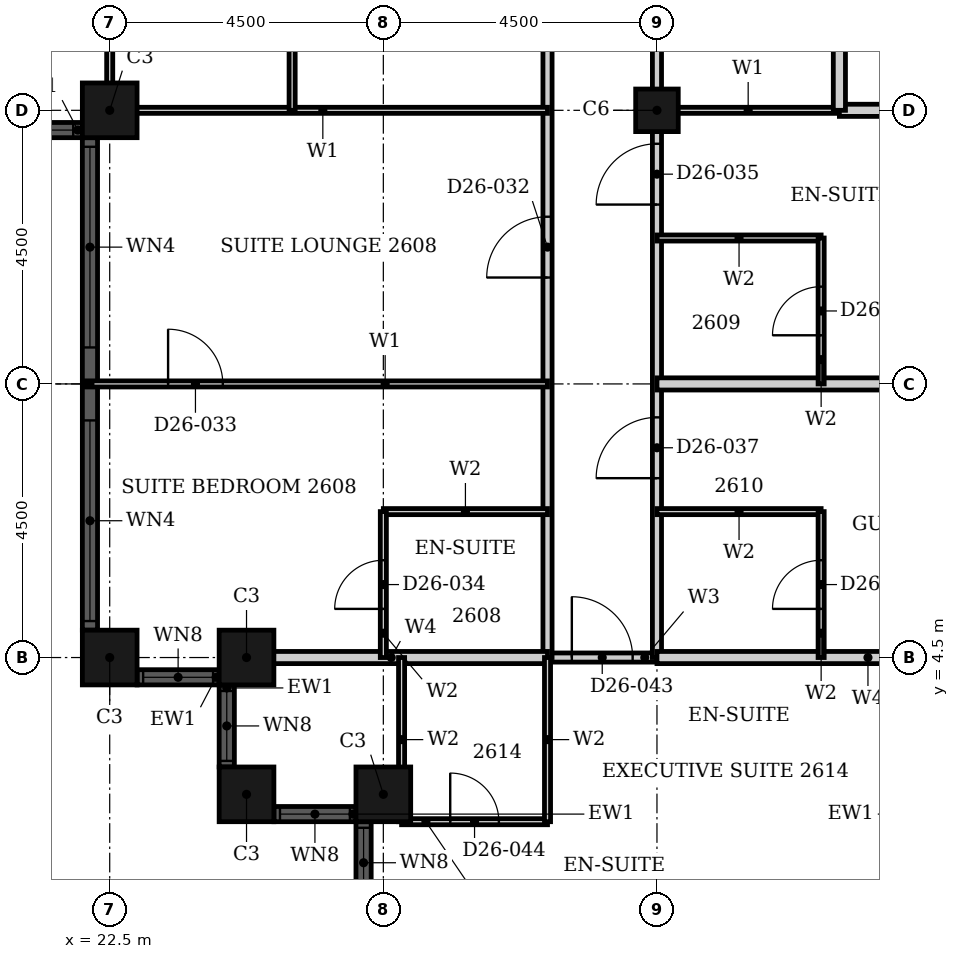
"""IFC4 building model, lengths in metres.
Left out: names, types, materials, properties, quantities, classifications, styles, units other than length and angle.
Written with IfcOpenShell. Run it as: python <this file> out.ifc"""

import sys

from ifc_helpers import new_model, si_unit, direction, frame, frame_2d, origin, origin_2d, place, context, subcontext, project, spatial, rectangle, hollow_rectangle, extrude, element, fill, save


model = new_model("IFC4")
c1 = context("Model", 3, precision=1e-05, world=origin(), true_north=direction((0.0, 1.0)))
c2 = subcontext(c1, "Body", "Model", "MODEL_VIEW")
j1 = project(units=[si_unit("LENGTHUNIT", "METRE"), si_unit("PLANEANGLEUNIT", "RADIAN")], contexts=[c1])
p1 = place(None, origin())
s1 = spatial("IfcSite", under=j1, at=p1, CompositionType="ELEMENT")
p2 = place(p1, origin())
s2 = spatial("IfcBuilding", under=s1, at=p2, CompositionType="ELEMENT")
p3 = place(p2, frame((0.0, 0.0, 108.0)))
s3 = spatial("IfcBuildingStorey", under=s2, at=p3, CompositionType="ELEMENT", Elevation=108.0)
for number, where, z_axis, x_axis in (
    (1, (22.5, 4.5, 0.0), (0.0, 0.0, 1.0), (1.0, 0.0, 0.0)),
    (2, (24.75, 4.5, 0.0), (0.0, 0.0, 1.0), (1.0, 0.0, 0.0)),
    (3, (24.75, 2.25, 0.0), (0.0, 0.0, 1.0), (1.0, 0.0, 0.0)),
    (4, (27.0, 2.25, 0.0), (0.0, 0.0, 1.0), (1.0, 0.0, 0.0)),
    (5, (22.5, 13.5, 0.0), (0.0, 0.0, 1.0), (1.0, 0.0, 0.0)),
):
    element("IfcColumn", number, at=place(p3, frame(where, z_axis=z_axis, x_axis=x_axis)), inside=s3, PredefinedType="COLUMN", context=c2, shape_type="SweptSolid", body=[
        extrude(hollow_rectangle(XDim=0.9, YDim=0.9, WallThickness=0.028, at=origin_2d()), origin(), (0.0, 0.0, 1.0), 3.6),
    ])
p4 = place(p3, frame((31.5, 13.5, 0.0), z_axis=(0.0, 0.0, 1.0), x_axis=(1.0, 0.0, 0.0)))
e6 = element("IfcColumn", 6, at=p4, inside=s3, PredefinedType="COLUMN", context=c2, shape_type="SweptSolid", body=[
    extrude(hollow_rectangle(XDim=0.7, YDim=0.7, WallThickness=0.022, at=origin_2d()), origin(), (0.0, 0.0, 1.0), 3.6),
])
p5 = place(p3, frame((22.95, 4.175, 0.0), z_axis=(0.0, 0.0, 1.0), x_axis=(1.0, 0.0, 0.0)))
e7 = element("IfcWall", 7, at=p5, inside=s3, PredefinedType="SOLIDWALL", context=c2, shape_type="SweptSolid", body=[
    extrude(rectangle(XDim=1.35, YDim=0.25, at=frame_2d((0.675, 0.0))), origin(), (0.0, 0.0, 1.0), 3.6),
])
p6 = place(p5, frame((0.1, 0.0, 0.9)))
e8 = element("IfcOpeningElement", 8, at=p6, cuts=e7, PredefinedType="OPENING", context=c2, shape_type="SweptSolid", body=[
    extrude(rectangle(XDim=1.15, YDim=2.08, at=frame_2d((0.575, 1.04))), frame((0.0, 0.135, 0.0), z_axis=(0.0, -1.0, 0.0), x_axis=(1.0, 0.0, 0.0)), (0.0, 0.0, 1.0), 0.27),
])
p7 = place(p3, frame((24.425, 4.05, 0.0), z_axis=(0.0, 0.0, 1.0), x_axis=(0.0, -1.0, 0.0)))
e9 = element("IfcWall", 9, at=p7, inside=s3, PredefinedType="SOLIDWALL", context=c2, shape_type="SweptSolid", body=[
    extrude(rectangle(XDim=1.35, YDim=0.25, at=frame_2d((0.675, 0.0))), origin(), (0.0, 0.0, 1.0), 3.6),
])
p8 = place(p7, frame((0.1, 0.0, 0.9)))
e10 = element("IfcOpeningElement", 10, at=p8, cuts=e9, PredefinedType="OPENING", context=c2, shape_type="SweptSolid", body=[
    extrude(rectangle(XDim=1.15, YDim=2.08, at=frame_2d((0.575, 1.04))), frame((0.0, 0.135, 0.0), z_axis=(0.0, -1.0, 0.0), x_axis=(1.0, 0.0, 0.0)), (0.0, 0.0, 1.0), 0.27),
])
p9 = place(p3, frame((25.2, 1.925, 0.0), z_axis=(0.0, 0.0, 1.0), x_axis=(1.0, 0.0, 0.0)))
e11 = element("IfcWall", 11, at=p9, inside=s3, PredefinedType="SOLIDWALL", context=c2, shape_type="SweptSolid", body=[
    extrude(rectangle(XDim=1.35, YDim=0.25, at=frame_2d((0.675, 0.0))), origin(), (0.0, 0.0, 1.0), 3.6),
])
p10 = place(p9, frame((0.1, 0.0, 0.9)))
e12 = element("IfcOpeningElement", 12, at=p10, cuts=e11, PredefinedType="OPENING", context=c2, shape_type="SweptSolid", body=[
    extrude(rectangle(XDim=1.15, YDim=2.08, at=frame_2d((0.575, 1.04))), frame((0.0, 0.135, 0.0), z_axis=(0.0, -1.0, 0.0), x_axis=(1.0, 0.0, 0.0)), (0.0, 0.0, 1.0), 0.27),
])
p11 = place(p3, frame((26.675, 1.8, 0.0), z_axis=(0.0, 0.0, 1.0), x_axis=(0.0, -1.0, 0.0)))
e13 = element("IfcWall", 13, at=p11, inside=s3, PredefinedType="SOLIDWALL", context=c2, shape_type="SweptSolid", body=[
    extrude(rectangle(XDim=1.35, YDim=0.25, at=frame_2d((0.675, 0.0))), origin(), (0.0, 0.0, 1.0), 3.6),
])
p12 = place(p11, frame((0.1, 0.0, 0.9)))
e14 = element("IfcOpeningElement", 14, at=p12, cuts=e13, PredefinedType="OPENING", context=c2, shape_type="SweptSolid", body=[
    extrude(rectangle(XDim=1.15, YDim=2.08, at=frame_2d((0.575, 1.04))), frame((0.0, 0.135, 0.0), z_axis=(0.0, -1.0, 0.0), x_axis=(1.0, 0.0, 0.0)), (0.0, 0.0, 1.0), 0.27),
])
p13 = place(p3, frame((18.45, 13.175, 0.0), z_axis=(0.0, 0.0, 1.0), x_axis=(1.0, 0.0, 0.0)))
e15 = element("IfcWall", 15, at=p13, inside=s3, PredefinedType="SOLIDWALL", context=c2, shape_type="SweptSolid", body=[
    extrude(rectangle(XDim=3.6, YDim=0.25, at=frame_2d((1.8, 0.0))), origin(), (0.0, 0.0, 1.0), 3.6),
])
p14 = place(p13, frame((0.15, 0.0, 0.9)))
e16 = element("IfcOpeningElement", 16, at=p14, cuts=e15, PredefinedType="OPENING", context=c2, shape_type="SweptSolid", body=[
    extrude(rectangle(XDim=3.3, YDim=2.08, at=frame_2d((1.65, 1.04))), frame((0.0, 0.135, 0.0), z_axis=(0.0, -1.0, 0.0), x_axis=(1.0, 0.0, 0.0)), (0.0, 0.0, 1.0), 0.27),
])
p15 = place(p3, frame((22.175, 13.05, 0.0), z_axis=(0.0, 0.0, 1.0), x_axis=(0.0, -1.0, 0.0)))
e17 = element("IfcWall", 17, at=p15, inside=s3, PredefinedType="SOLIDWALL", context=c2, shape_type="SweptSolid", body=[
    extrude(rectangle(XDim=8.1, YDim=0.25, at=frame_2d((4.05, 0.0))), origin(), (0.0, 0.0, 1.0), 3.6),
])
p16 = place(p15, frame((0.15, 0.0, 0.9)))
e18 = element("IfcOpeningElement", 18, at=p16, cuts=e17, PredefinedType="OPENING", context=c2, shape_type="SweptSolid", body=[
    extrude(rectangle(XDim=3.3, YDim=2.08, at=frame_2d((1.65, 1.04))), frame((0.0, 0.135, 0.0), z_axis=(0.0, -1.0, 0.0), x_axis=(1.0, 0.0, 0.0)), (0.0, 0.0, 1.0), 0.27),
])
p17 = place(p15, frame((4.65, 0.0, 0.9)))
e19 = element("IfcOpeningElement", 19, at=p17, cuts=e17, PredefinedType="OPENING", context=c2, shape_type="SweptSolid", body=[
    extrude(rectangle(XDim=3.3, YDim=2.08, at=frame_2d((1.65, 1.04))), frame((0.0, 0.135, 0.0), z_axis=(0.0, -1.0, 0.0), x_axis=(1.0, 0.0, 0.0)), (0.0, 0.0, 1.0), 0.27),
])
p18 = place(p3, frame((29.7, 4.5, 0.0), z_axis=(0.0, 0.0, 1.0), x_axis=(1.0, 0.0, 0.0)))
e20 = element("IfcWall", 20, at=p18, inside=s3, PredefinedType="PARTITIONING", context=c2, shape_type="SweptSolid", body=[
    extrude(rectangle(XDim=1.8, YDim=0.15, at=frame_2d((0.9, 0.0))), origin(), (0.0, 0.0, 1.0), 3.3),
])
p19 = place(p18, frame((0.4, 0.0, 0.0)))
e21 = element("IfcOpeningElement", 21, at=p19, cuts=e20, PredefinedType="OPENING", context=c2, shape_type="SweptSolid", body=[
    extrude(rectangle(XDim=1.0, YDim=2.1, at=frame_2d((0.5, 1.05))), frame((0.0, 0.085, 0.0), z_axis=(0.0, -1.0, 0.0), x_axis=(1.0, 0.0, 0.0)), (0.0, 0.0, 1.0), 0.17),
])
p20 = place(p3, frame((29.7, 4.5, 0.0), z_axis=(0.0, 0.0, 1.0), x_axis=(0.0, 1.0, 0.0)))
e22 = element("IfcWall", 22, at=p20, inside=s3, PredefinedType="PARTITIONING", context=c2, shape_type="SweptSolid", body=[
    extrude(rectangle(XDim=16.2, YDim=0.15, at=frame_2d((8.1, 0.0))), origin(), (0.0, 0.0, 1.0), 3.3),
])
p21 = place(p20, frame((6.25, 0.0, 0.0)))
e23 = element("IfcOpeningElement", 23, at=p21, cuts=e22, PredefinedType="OPENING", context=c2, shape_type="SweptSolid", body=[
    extrude(rectangle(XDim=1.0, YDim=2.1, at=frame_2d((0.5, 1.05))), frame((0.0, 0.085, 0.0), z_axis=(0.0, -1.0, 0.0), x_axis=(1.0, 0.0, 0.0)), (0.0, 0.0, 1.0), 0.17),
])
p22 = place(p3, frame((31.5, 4.5, 0.0), z_axis=(0.0, 0.0, 1.0), x_axis=(0.0, 1.0, 0.0)))
e24 = element("IfcWall", 24, at=p22, inside=s3, PredefinedType="PARTITIONING", context=c2, shape_type="SweptSolid", body=[
    extrude(rectangle(XDim=16.2, YDim=0.15, at=frame_2d((8.1, 0.0))), origin(), (0.0, 0.0, 1.0), 2.58),
])
p23 = place(p22, frame((7.45, 0.0, 0.0)))
e25 = element("IfcOpeningElement", 25, at=p23, cuts=e24, PredefinedType="OPENING", context=c2, shape_type="SweptSolid", body=[
    extrude(rectangle(XDim=1.0, YDim=2.1, at=frame_2d((0.5, 1.05))), frame((0.0, 0.085, 0.0), z_axis=(0.0, -1.0, 0.0), x_axis=(1.0, 0.0, 0.0)), (0.0, 0.0, 1.0), 0.17),
])
p24 = place(p22, frame((2.95, 0.0, 0.0)))
e26 = element("IfcOpeningElement", 26, at=p24, cuts=e24, PredefinedType="OPENING", context=c2, shape_type="SweptSolid", body=[
    extrude(rectangle(XDim=1.0, YDim=2.1, at=frame_2d((0.5, 1.05))), frame((0.0, 0.085, 0.0), z_axis=(0.0, -1.0, 0.0), x_axis=(1.0, 0.0, 0.0)), (0.0, 0.0, 1.0), 0.17),
])
p25 = place(p3, frame((31.5, 13.5, 0.0), z_axis=(0.0, 0.0, 1.0), x_axis=(1.0, 0.0, 0.0)))
e27 = element("IfcWall", 27, at=p25, inside=s3, PredefinedType="PARTITIONING", context=c2, shape_type="SweptSolid", body=[
    extrude(rectangle(XDim=3.0, YDim=0.1, at=frame_2d((1.5, 0.0))), origin(), (0.0, 0.0, 1.0), 2.38),
])
p26 = place(p3, frame((22.31, 13.5, 0.0), z_axis=(0.0, 0.0, 1.0), x_axis=(1.0, 0.0, 0.0)))
e28 = element("IfcWall", 28, at=p26, inside=s3, PredefinedType="PARTITIONING", context=c2, shape_type="SweptSolid", body=[
    extrude(rectangle(XDim=7.39, YDim=0.1, at=frame_2d((3.695, 0.0))), origin(), (0.0, 0.0, 1.0), 2.38),
])
p27 = place(p3, frame((22.11, 9.0, 0.0), z_axis=(0.0, 0.0, 1.0), x_axis=(1.0, 0.0, 0.0)))
e29 = element("IfcWall", 29, at=p27, inside=s3, PredefinedType="PARTITIONING", context=c2, shape_type="SweptSolid", body=[
    extrude(rectangle(XDim=7.59, YDim=0.1, at=frame_2d((3.795, 0.0))), origin(), (0.0, 0.0, 1.0), 3.3),
])
p28 = place(p27, frame((1.35, 0.0, 0.0)))
e30 = element("IfcOpeningElement", 30, at=p28, cuts=e29, PredefinedType="OPENING", context=c2, shape_type="SweptSolid", body=[
    extrude(rectangle(XDim=0.9, YDim=2.1, at=frame_2d((0.45, 1.05))), frame((0.0, 0.06, 0.0), z_axis=(0.0, -1.0, 0.0), x_axis=(1.0, 0.0, 0.0)), (0.0, 0.0, 1.0), 0.12),
])
p29 = place(p3, frame((22.5, 13.31, 0.0), z_axis=(0.0, 0.0, 1.0), x_axis=(0.0, 1.0, 0.0)))
e31 = element("IfcWall", 31, at=p29, inside=s3, PredefinedType="PARTITIONING", context=c2, shape_type="SweptSolid", body=[
    extrude(rectangle(XDim=7.39, YDim=0.1, at=frame_2d((3.695, 0.0))), origin(), (0.0, 0.0, 1.0), 3.3),
])
p30 = place(p3, frame((25.5, 13.5, 0.0), z_axis=(0.0, 0.0, 1.0), x_axis=(0.0, 1.0, 0.0)))
e32 = element("IfcWall", 32, at=p30, inside=s3, PredefinedType="PARTITIONING", context=c2, shape_type="SweptSolid", body=[
    extrude(rectangle(XDim=7.2, YDim=0.1, at=frame_2d((3.6, 0.0))), origin(), (0.0, 0.0, 1.0), 3.3),
])
p31 = place(p3, frame((31.5, 4.5, 0.0), z_axis=(0.0, 0.0, 1.0), x_axis=(1.0, 0.0, 0.0)))
e33 = element("IfcWall", 33, at=p31, inside=s3, PredefinedType="PARTITIONING", context=c2, shape_type="SweptSolid", body=[
    extrude(rectangle(XDim=6.94, YDim=0.2, at=frame_2d((3.47, 0.0))), origin(), (0.0, 0.0, 1.0), 3.3),
])
p32 = place(p3, frame((24.56, 4.5, 0.0), z_axis=(0.0, 0.0, 1.0), x_axis=(1.0, 0.0, 0.0)))
e34 = element("IfcWall", 34, at=p32, inside=s3, PredefinedType="PARTITIONING", context=c2, shape_type="SweptSolid", body=[
    extrude(rectangle(XDim=5.14, YDim=0.2, at=frame_2d((2.57, 0.0))), origin(), (0.0, 0.0, 1.0), 3.3),
])
p33 = place(p3, frame((31.5, 9.0, 0.0), z_axis=(0.0, 0.0, 1.0), x_axis=(1.0, 0.0, 0.0)))
e35 = element("IfcWall", 35, at=p33, inside=s3, PredefinedType="PARTITIONING", context=c2, shape_type="SweptSolid", body=[
    extrude(rectangle(XDim=9.39, YDim=0.2, at=frame_2d((4.695, 0.0))), origin(), (0.0, 0.0, 1.0), 3.3),
])
p34 = place(p3, frame((27.3, 1.8, 0.0), z_axis=(0.0, 0.0, 1.0), x_axis=(1.0, 0.0, 0.0)))
e36 = element("IfcWall", 36, at=p34, inside=s3, PredefinedType="PARTITIONING", context=c2, shape_type="SweptSolid", body=[
    extrude(rectangle(XDim=2.4, YDim=0.1, at=frame_2d((1.2, 0.0))), origin(), (0.0, 0.0, 1.0), 3.3),
])
p35 = place(p34, frame((0.8, 0.0, 0.0)))
e37 = element("IfcOpeningElement", 37, at=p35, cuts=e36, PredefinedType="OPENING", context=c2, shape_type="SweptSolid", body=[
    extrude(rectangle(XDim=0.8, YDim=2.1, at=frame_2d((0.4, 1.05))), frame((0.0, 0.06, 0.0), z_axis=(0.0, -1.0, 0.0), x_axis=(1.0, 0.0, 0.0)), (0.0, 0.0, 1.0), 0.12),
])
for number, where, z_axis, x_axis in (
    (38, (31.5, 11.4, 0.0), (0.0, 0.0, 1.0), (1.0, 0.0, 0.0)),
    (39, (31.5, 6.9, 0.0), (0.0, 0.0, 1.0), (1.0, 0.0, 0.0)),
    (40, (27.0, 6.9, 0.0), (0.0, 0.0, 1.0), (1.0, 0.0, 0.0)),
):
    element("IfcWall", number, at=place(p3, frame(where, z_axis=z_axis, x_axis=x_axis)), inside=s3, PredefinedType="PARTITIONING", context=c2, shape_type="SweptSolid", body=[
        extrude(rectangle(XDim=2.7, YDim=0.1, at=frame_2d((1.35, 0.0))), origin(), (0.0, 0.0, 1.0), 3.3),
    ])
p36 = place(p3, frame((27.0, 4.5, 0.0), z_axis=(0.0, 0.0, 1.0), x_axis=(0.0, 1.0, 0.0)))
e41 = element("IfcWall", 41, at=p36, inside=s3, PredefinedType="PARTITIONING", context=c2, shape_type="SweptSolid", body=[
    extrude(rectangle(XDim=2.4, YDim=0.1, at=frame_2d((1.2, 0.0))), origin(), (0.0, 0.0, 1.0), 2.58),
])
p37 = place(p36, frame((0.8, 0.0, 0.0)))
e42 = element("IfcOpeningElement", 42, at=p37, cuts=e41, PredefinedType="OPENING", context=c2, shape_type="SweptSolid", body=[
    extrude(rectangle(XDim=0.8, YDim=2.1, at=frame_2d((0.4, 1.05))), frame((0.0, 0.06, 0.0), z_axis=(0.0, -1.0, 0.0), x_axis=(1.0, 0.0, 0.0)), (0.0, 0.0, 1.0), 0.12),
])
for number, where, z_axis, x_axis in (
    (43, (27.3, 1.8, 0.0), (0.0, 0.0, 1.0), (0.0, 1.0, 0.0)),
    (44, (29.7, 1.8, 0.0), (0.0, 0.0, 1.0), (0.0, 1.0, 0.0)),
):
    element("IfcWall", number, at=place(p3, frame(where, z_axis=z_axis, x_axis=x_axis)), inside=s3, PredefinedType="PARTITIONING", context=c2, shape_type="SweptSolid", body=[
        extrude(rectangle(XDim=2.7, YDim=0.1, at=frame_2d((1.35, 0.0))), origin(), (0.0, 0.0, 1.0), 3.3),
    ])
p38 = place(p3, frame((34.2, 9.0, 0.0), z_axis=(0.0, 0.0, 1.0), x_axis=(0.0, 1.0, 0.0)))
e45 = element("IfcWall", 45, at=p38, inside=s3, PredefinedType="PARTITIONING", context=c2, shape_type="SweptSolid", body=[
    extrude(rectangle(XDim=2.4, YDim=0.1, at=frame_2d((1.2, 0.0))), origin(), (0.0, 0.0, 1.0), 3.3),
])
p39 = place(p38, frame((0.8, 0.0, 0.0)))
e46 = element("IfcOpeningElement", 46, at=p39, cuts=e45, PredefinedType="OPENING", context=c2, shape_type="SweptSolid", body=[
    extrude(rectangle(XDim=0.8, YDim=2.1, at=frame_2d((0.4, 1.05))), frame((0.0, 0.06, 0.0), z_axis=(0.0, -1.0, 0.0), x_axis=(1.0, 0.0, 0.0)), (0.0, 0.0, 1.0), 0.12),
])
p40 = place(p3, frame((34.2, 4.5, 0.0), z_axis=(0.0, 0.0, 1.0), x_axis=(0.0, 1.0, 0.0)))
e47 = element("IfcWall", 47, at=p40, inside=s3, PredefinedType="PARTITIONING", context=c2, shape_type="SweptSolid", body=[
    extrude(rectangle(XDim=2.4, YDim=0.1, at=frame_2d((1.2, 0.0))), origin(), (0.0, 0.0, 1.0), 3.3),
])
p41 = place(p40, frame((0.8, 0.0, 0.0)))
e48 = element("IfcOpeningElement", 48, at=p41, cuts=e47, PredefinedType="OPENING", context=c2, shape_type="SweptSolid", body=[
    extrude(rectangle(XDim=0.8, YDim=2.1, at=frame_2d((0.4, 1.05))), frame((0.0, 0.06, 0.0), z_axis=(0.0, -1.0, 0.0), x_axis=(1.0, 0.0, 0.0)), (0.0, 0.0, 1.0), 0.12),
])
p42 = place(p3, frame((34.5, 13.5, 0.0), z_axis=(0.0, 0.0, 1.0), x_axis=(1.0, 0.0, 0.0)))
e49 = element("IfcWall", 49, at=p42, inside=s3, PredefinedType="PARTITIONING", context=c2, shape_type="SweptSolid", body=[
    extrude(rectangle(XDim=6.19, YDim=0.2, at=frame_2d((3.095, 0.0))), origin(), (0.0, 0.0, 1.0), 2.38),
])
p43 = place(p3, frame((34.5, 13.5, 0.0), z_axis=(0.0, 0.0, 1.0), x_axis=(0.0, 1.0, 0.0)))
e50 = element("IfcWall", 50, at=p43, inside=s3, PredefinedType="PARTITIONING", context=c2, shape_type="SweptSolid", body=[
    extrude(rectangle(XDim=7.2, YDim=0.2, at=frame_2d((3.6, 0.0))), origin(), (0.0, 0.0, 1.0), 3.3),
])
p44 = place(p6, origin())
e51 = element("IfcWindow", 51, at=p44, inside=s3, PartitioningType="SINGLE_PANEL", PredefinedType="WINDOW", context=c2, shape_type="SweptSolid", body=[
    extrude(rectangle(XDim=1.15, YDim=2.08, at=frame_2d((0.575, 1.04))), frame((0.0, 0.03, 0.0), z_axis=(0.0, -1.0, 0.0), x_axis=(1.0, 0.0, 0.0)), (0.0, 0.0, 1.0), 0.06),
])
fill(e8, e51)
p45 = place(p8, origin())
e52 = element("IfcWindow", 52, at=p45, inside=s3, PartitioningType="SINGLE_PANEL", PredefinedType="WINDOW", context=c2, shape_type="SweptSolid", body=[
    extrude(rectangle(XDim=1.15, YDim=2.08, at=frame_2d((0.575, 1.04))), frame((0.0, 0.03, 0.0), z_axis=(0.0, -1.0, 0.0), x_axis=(1.0, 0.0, 0.0)), (0.0, 0.0, 1.0), 0.06),
])
fill(e10, e52)
p46 = place(p10, origin())
e53 = element("IfcWindow", 53, at=p46, inside=s3, PartitioningType="SINGLE_PANEL", PredefinedType="WINDOW", context=c2, shape_type="SweptSolid", body=[
    extrude(rectangle(XDim=1.15, YDim=2.08, at=frame_2d((0.575, 1.04))), frame((0.0, 0.03, 0.0), z_axis=(0.0, -1.0, 0.0), x_axis=(1.0, 0.0, 0.0)), (0.0, 0.0, 1.0), 0.06),
])
fill(e12, e53)
p47 = place(p12, origin())
e54 = element("IfcWindow", 54, at=p47, inside=s3, PartitioningType="SINGLE_PANEL", PredefinedType="WINDOW", context=c2, shape_type="SweptSolid", body=[
    extrude(rectangle(XDim=1.15, YDim=2.08, at=frame_2d((0.575, 1.04))), frame((0.0, 0.03, 0.0), z_axis=(0.0, -1.0, 0.0), x_axis=(1.0, 0.0, 0.0)), (0.0, 0.0, 1.0), 0.06),
])
fill(e14, e54)
p48 = place(p14, origin())
e55 = element("IfcWindow", 55, at=p48, inside=s3, PartitioningType="SINGLE_PANEL", PredefinedType="WINDOW", context=c2, shape_type="SweptSolid", body=[
    extrude(rectangle(XDim=3.3, YDim=2.08, at=frame_2d((1.65, 1.04))), frame((0.0, 0.03, 0.0), z_axis=(0.0, -1.0, 0.0), x_axis=(1.0, 0.0, 0.0)), (0.0, 0.0, 1.0), 0.06),
])
fill(e16, e55)
p49 = place(p16, origin())
e56 = element("IfcWindow", 56, at=p49, inside=s3, PartitioningType="SINGLE_PANEL", PredefinedType="WINDOW", context=c2, shape_type="SweptSolid", body=[
    extrude(rectangle(XDim=3.3, YDim=2.08, at=frame_2d((1.65, 1.04))), frame((0.0, 0.03, 0.0), z_axis=(0.0, -1.0, 0.0), x_axis=(1.0, 0.0, 0.0)), (0.0, 0.0, 1.0), 0.06),
])
fill(e18, e56)
p50 = place(p17, origin())
e57 = element("IfcWindow", 57, at=p50, inside=s3, PartitioningType="SINGLE_PANEL", PredefinedType="WINDOW", context=c2, shape_type="SweptSolid", body=[
    extrude(rectangle(XDim=3.3, YDim=2.08, at=frame_2d((1.65, 1.04))), frame((0.0, 0.03, 0.0), z_axis=(0.0, -1.0, 0.0), x_axis=(1.0, 0.0, 0.0)), (0.0, 0.0, 1.0), 0.06),
])
fill(e19, e57)
p51 = place(p21, origin())
e58 = element("IfcDoor", 58, at=p51, inside=s3, OperationType="SINGLE_SWING_RIGHT", PredefinedType="DOOR", context=c2, shape_type="SweptSolid", body=[
    extrude(rectangle(XDim=1.0, YDim=2.1, at=frame_2d((0.5, 1.05))), frame((0.0, 0.025, 0.0), z_axis=(0.0, -1.0, 0.0), x_axis=(1.0, 0.0, 0.0)), (0.0, 0.0, 1.0), 0.05),
])
fill(e23, e58)
p52 = place(p28, origin())
e59 = element("IfcDoor", 59, at=p52, inside=s3, OperationType="SINGLE_SWING_LEFT", PredefinedType="DOOR", context=c2, shape_type="SweptSolid", body=[
    extrude(rectangle(XDim=0.9, YDim=2.1, at=frame_2d((0.45, 1.05))), frame((0.0, 0.025, 0.0), z_axis=(0.0, -1.0, 0.0), x_axis=(1.0, 0.0, 0.0)), (0.0, 0.0, 1.0), 0.05),
])
fill(e30, e59)
p53 = place(p37, origin())
e60 = element("IfcDoor", 60, at=p53, inside=s3, OperationType="SINGLE_SWING_LEFT", PredefinedType="DOOR", context=c2, shape_type="SweptSolid", body=[
    extrude(rectangle(XDim=0.8, YDim=2.1, at=frame_2d((0.4, 1.05))), frame((0.0, 0.025, 0.0), z_axis=(0.0, -1.0, 0.0), x_axis=(1.0, 0.0, 0.0)), (0.0, 0.0, 1.0), 0.05),
])
fill(e42, e60)
p54 = place(p23, origin())
e61 = element("IfcDoor", 61, at=p54, inside=s3, OperationType="SINGLE_SWING_RIGHT", PredefinedType="DOOR", context=c2, shape_type="SweptSolid", body=[
    extrude(rectangle(XDim=1.0, YDim=2.1, at=frame_2d((0.5, 1.05))), frame((0.0, 0.025, 0.0), z_axis=(0.0, -1.0, 0.0), x_axis=(1.0, 0.0, 0.0)), (0.0, 0.0, 1.0), 0.05),
])
fill(e25, e61)
p55 = place(p39, origin())
e62 = element("IfcDoor", 62, at=p55, inside=s3, OperationType="SINGLE_SWING_RIGHT", PredefinedType="DOOR", context=c2, shape_type="SweptSolid", body=[
    extrude(rectangle(XDim=0.8, YDim=2.1, at=frame_2d((0.4, 1.05))), frame((0.0, 0.025, 0.0), z_axis=(0.0, -1.0, 0.0), x_axis=(1.0, 0.0, 0.0)), (0.0, 0.0, 1.0), 0.05),
])
fill(e46, e62)
p56 = place(p24, origin())
e63 = element("IfcDoor", 63, at=p56, inside=s3, OperationType="SINGLE_SWING_RIGHT", PredefinedType="DOOR", context=c2, shape_type="SweptSolid", body=[
    extrude(rectangle(XDim=1.0, YDim=2.1, at=frame_2d((0.5, 1.05))), frame((0.0, 0.025, 0.0), z_axis=(0.0, -1.0, 0.0), x_axis=(1.0, 0.0, 0.0)), (0.0, 0.0, 1.0), 0.05),
])
fill(e26, e63)
p57 = place(p41, origin())
e64 = element("IfcDoor", 64, at=p57, inside=s3, OperationType="SINGLE_SWING_LEFT", PredefinedType="DOOR", context=c2, shape_type="SweptSolid", body=[
    extrude(rectangle(XDim=0.8, YDim=2.1, at=frame_2d((0.4, 1.05))), frame((0.0, 0.025, 0.0), z_axis=(0.0, -1.0, 0.0), x_axis=(1.0, 0.0, 0.0)), (0.0, 0.0, 1.0), 0.05),
])
fill(e48, e64)
p58 = place(p19, origin())
e65 = element("IfcDoor", 65, at=p58, inside=s3, OperationType="SINGLE_SWING_RIGHT", PredefinedType="DOOR", context=c2, shape_type="SweptSolid", body=[
    extrude(rectangle(XDim=1.0, YDim=2.1, at=frame_2d((0.5, 1.05))), frame((0.0, 0.025, 0.0), z_axis=(0.0, -1.0, 0.0), x_axis=(1.0, 0.0, 0.0)), (0.0, 0.0, 1.0), 0.05),
])
fill(e21, e65)
p59 = place(p35, origin())
e66 = element("IfcDoor", 66, at=p59, inside=s3, OperationType="SINGLE_SWING_RIGHT", PredefinedType="DOOR", context=c2, shape_type="SweptSolid", body=[
    extrude(rectangle(XDim=0.8, YDim=2.1, at=frame_2d((0.4, 1.05))), frame((0.0, 0.025, 0.0), z_axis=(0.0, -1.0, 0.0), x_axis=(1.0, 0.0, 0.0)), (0.0, 0.0, 1.0), 0.05),
])
fill(e37, e66)
save(model, sys.argv[1])
